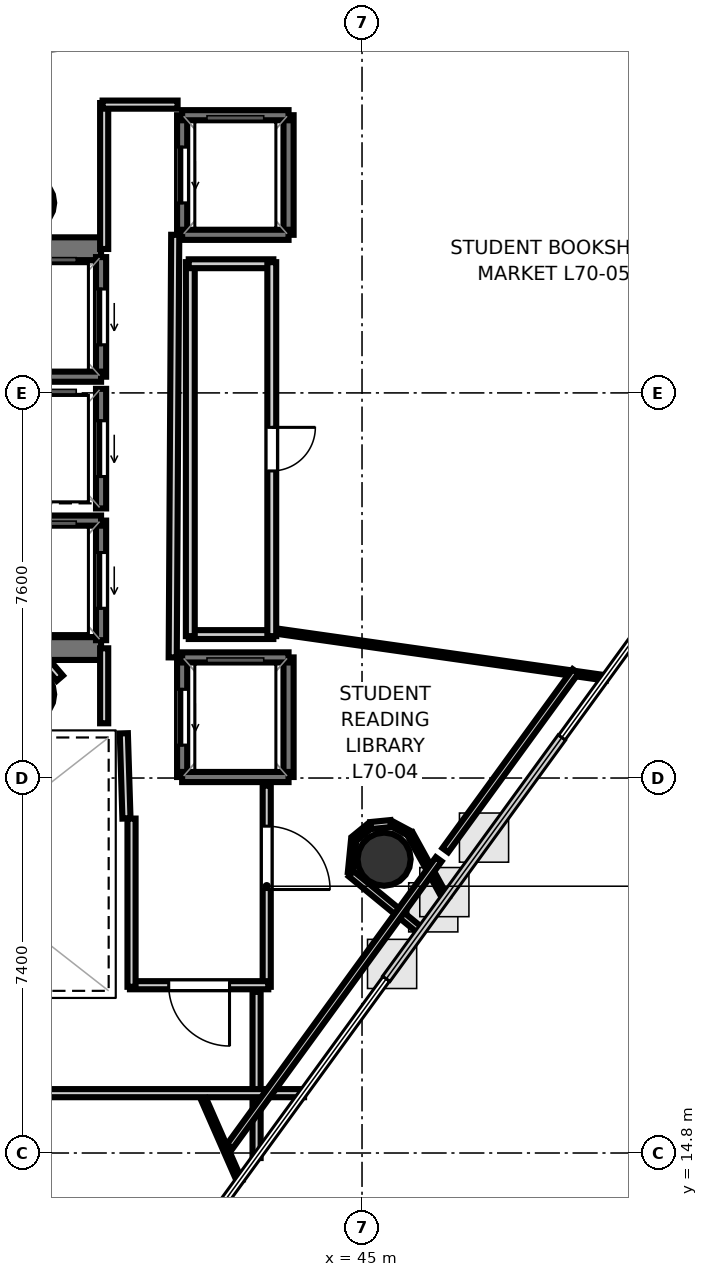
"""IFC4 building model, lengths in metres.
Left out: names, types, materials, properties, quantities, classifications, styles, units other than length and angle.
Written with IfcOpenShell. Run it as: python <this file> out.ifc"""

import sys

from ifc_helpers import new_model, si_unit, direction, frame, frame_2d, origin, origin_2d, place, context, subcontext, project, spatial, rectangle, hollow_circle, extrude, element, fill, save


model = new_model("IFC4")
c1 = context("Model", 3, precision=1e-05, world=origin(), true_north=direction((0.0, 1.0)))
c2 = subcontext(c1, "Body", "Model", "MODEL_VIEW")
j1 = project(units=[si_unit("LENGTHUNIT", "METRE"), si_unit("PLANEANGLEUNIT", "RADIAN")], contexts=[c1])
p1 = place(None, origin())
s1 = spatial("IfcSite", under=j1, at=p1, CompositionType="ELEMENT")
p2 = place(p1, origin())
s2 = spatial("IfcBuilding", under=s1, at=p2, CompositionType="ELEMENT")
p3 = place(p2, frame((0.0, 0.0, 272.3)))
s3 = spatial("IfcBuildingStorey", under=s2, at=p3, CompositionType="ELEMENT", Elevation=272.3)
p4 = place(p3, frame((29.33, 32.645, 0.0), z_axis=(0.0, 0.0, 1.0), x_axis=(1.0, 0.0, 0.0)))
e1 = element("IfcWall", 1, at=p4, inside=s3, PredefinedType="SHEAR", context=c2, shape_type="SweptSolid", body=[
    extrude(rectangle(XDim=10.52, YDim=0.45, at=frame_2d((5.26, 0.0))), origin(), (0.0, 0.0, 1.0), 3.4),
])
p5 = place(p4, frame((0.895, 0.0, 0.0)))
e2 = element("IfcOpeningElement", 2, at=p5, cuts=e1, PredefinedType="OPENING", context=c2, shape_type="SweptSolid", body=[
    extrude(rectangle(XDim=1.25, YDim=2.15, at=frame_2d((0.625, 1.075))), frame((0.0, 0.235, 0.0), z_axis=(0.0, -1.0, 0.0), x_axis=(1.0, 0.0, 0.0)), (0.0, 0.0, 1.0), 0.47),
])
p6 = place(p3, frame((29.33, 24.755, 0.0), z_axis=(0.0, 0.0, 1.0), x_axis=(1.0, 0.0, 0.0)))
e3 = element("IfcWall", 3, at=p6, inside=s3, PredefinedType="SHEAR", context=c2, shape_type="SweptSolid", body=[
    extrude(rectangle(XDim=10.52, YDim=0.45, at=frame_2d((5.26, 0.0))), origin(), (0.0, 0.0, 1.0), 3.4),
])
p7 = place(p6, frame((0.695, 0.0, 0.0)))
e4 = element("IfcOpeningElement", 4, at=p7, cuts=e3, PredefinedType="OPENING", context=c2, shape_type="SweptSolid", body=[
    extrude(rectangle(XDim=1.25, YDim=2.15, at=frame_2d((0.625, 1.075))), frame((0.0, 0.235, 0.0), z_axis=(0.0, -1.0, 0.0), x_axis=(1.0, 0.0, 0.0)), (0.0, 0.0, 1.0), 0.47),
])
for number, where, z_axis, x_axis in (
    (5, (38.4, 33.55, 0.0), (0.0, 0.0, 1.0), (1.0, 0.0, 0.0)),
    (6, (38.4, 23.85, 0.0), (0.0, 0.0, 1.0), (1.0, 0.0, 0.0)),
    (7, (45.436, 20.598, 0.0), (0.0, 0.0, 1.0), (1.0, 0.0, 0.0)),
):
    element("IfcColumn", number, at=place(p3, frame(where, z_axis=z_axis, x_axis=x_axis)), inside=s3, PredefinedType="COLUMN", context=c2, shape_type="SweptSolid", body=[
        extrude(hollow_circle(Radius=0.525, WallThickness=0.028, at=origin_2d()), origin(), (0.0, 0.0, 1.0), 3.7),
    ])
p8 = place(p3, frame((39.85, 30.12, 0.0), z_axis=(0.0, 0.0, 1.0), x_axis=(0.0, 1.0, 0.0)))
e8 = element("IfcWall", 8, at=p8, inside=s3, PredefinedType="SOLIDWALL", context=c2, shape_type="SweptSolid", body=[
    extrude(rectangle(XDim=2.36, YDim=0.2, at=frame_2d((1.18, 0.0))), origin(), (0.0, 0.0, 1.0), 3.4),
])
p9 = place(p8, frame((0.63, 0.0, 0.0)))
e9 = element("IfcOpeningElement", 9, at=p9, cuts=e8, PredefinedType="OPENING", context=c2, shape_type="SweptSolid", body=[
    extrude(rectangle(XDim=1.1, YDim=2.15, at=frame_2d((0.55, 1.075))), frame((0.0, 0.11, 0.0), z_axis=(0.0, -1.0, 0.0), x_axis=(1.0, 0.0, 0.0)), (0.0, 0.0, 1.0), 0.22),
])
p10 = place(p3, frame((37.75, 30.12, 0.0), z_axis=(0.0, 0.0, 1.0), x_axis=(1.0, 0.0, 0.0)))
e10 = element("IfcWall", 10, at=p10, inside=s3, PredefinedType="SOLIDWALL", context=c2, shape_type="SweptSolid", body=[
    extrude(rectangle(XDim=2.1, YDim=0.2, at=frame_2d((1.05, 0.0))), origin(), (0.0, 0.0, 1.0), 3.4),
])
p11 = place(p3, frame((39.85, 24.92, 0.0), z_axis=(0.0, 0.0, 1.0), x_axis=(0.0, 1.0, 0.0)))
e11 = element("IfcWall", 11, at=p11, inside=s3, PredefinedType="SOLIDWALL", context=c2, shape_type="SweptSolid", body=[
    extrude(rectangle(XDim=2.36, YDim=0.2, at=frame_2d((1.18, 0.0))), origin(), (0.0, 0.0, 1.0), 3.4),
])
p12 = place(p11, frame((0.63, 0.0, 0.0)))
e12 = element("IfcOpeningElement", 12, at=p12, cuts=e11, PredefinedType="OPENING", context=c2, shape_type="SweptSolid", body=[
    extrude(rectangle(XDim=1.1, YDim=2.15, at=frame_2d((0.55, 1.075))), frame((0.0, 0.11, 0.0), z_axis=(0.0, -1.0, 0.0), x_axis=(1.0, 0.0, 0.0)), (0.0, 0.0, 1.0), 0.22),
])
p13 = place(p3, frame((37.75, 27.28, 0.0), z_axis=(0.0, 0.0, 1.0), x_axis=(1.0, 0.0, 0.0)))
e13 = element("IfcWall", 13, at=p13, inside=s3, PredefinedType="SOLIDWALL", context=c2, shape_type="SweptSolid", body=[
    extrude(rectangle(XDim=2.1, YDim=0.2, at=frame_2d((1.05, 0.0))), origin(), (0.0, 0.0, 1.0), 3.4),
])
p14 = place(p3, frame((39.85, 27.52, 0.0), z_axis=(0.0, 0.0, 1.0), x_axis=(0.0, 1.0, 0.0)))
e14 = element("IfcWall", 14, at=p14, inside=s3, PredefinedType="SOLIDWALL", context=c2, shape_type="SweptSolid", body=[
    extrude(rectangle(XDim=2.36, YDim=0.2, at=frame_2d((1.18, 0.0))), origin(), (0.0, 0.0, 1.0), 3.4),
])
p15 = place(p14, frame((0.63, 0.0, 0.0)))
e15 = element("IfcOpeningElement", 15, at=p15, cuts=e14, PredefinedType="OPENING", context=c2, shape_type="SweptSolid", body=[
    extrude(rectangle(XDim=1.1, YDim=2.15, at=frame_2d((0.55, 1.075))), frame((0.0, 0.11, 0.0), z_axis=(0.0, -1.0, 0.0), x_axis=(1.0, 0.0, 0.0)), (0.0, 0.0, 1.0), 0.22),
])
p16 = place(p3, frame((43.55, 22.22, 0.0), z_axis=(0.0, 0.0, 1.0), x_axis=(0.0, 1.0, 0.0)))
e16 = element("IfcWall", 16, at=p16, inside=s3, PredefinedType="SOLIDWALL", context=c2, shape_type="SweptSolid", body=[
    extrude(rectangle(XDim=2.36, YDim=0.2, at=frame_2d((1.18, 0.0))), origin(), (0.0, 0.0, 1.0), 3.4),
])
p17 = place(p3, frame((41.45, 22.22, 0.0), z_axis=(0.0, 0.0, 1.0), x_axis=(0.0, 1.0, 0.0)))
e17 = element("IfcWall", 17, at=p17, inside=s3, PredefinedType="SOLIDWALL", context=c2, shape_type="SweptSolid", body=[
    extrude(rectangle(XDim=2.36, YDim=0.2, at=frame_2d((1.18, 0.0))), origin(), (0.0, 0.0, 1.0), 3.4),
])
p18 = place(p17, frame((0.63, 0.0, 0.0)))
e18 = element("IfcOpeningElement", 18, at=p18, cuts=e17, PredefinedType="OPENING", context=c2, shape_type="SweptSolid", body=[
    extrude(rectangle(XDim=1.1, YDim=2.15, at=frame_2d((0.55, 1.075))), frame((0.0, 0.11, 0.0), z_axis=(0.0, -1.0, 0.0), x_axis=(1.0, 0.0, 0.0)), (0.0, 0.0, 1.0), 0.22),
])
for number, where, z_axis, x_axis in (
    (19, (41.45, 24.58, 0.0), (0.0, 0.0, 1.0), (1.0, 0.0, 0.0)),
    (20, (41.45, 22.22, 0.0), (0.0, 0.0, 1.0), (1.0, 0.0, 0.0)),
):
    element("IfcWall", number, at=place(p3, frame(where, z_axis=z_axis, x_axis=x_axis)), inside=s3, PredefinedType="SOLIDWALL", context=c2, shape_type="SweptSolid", body=[
        extrude(rectangle(XDim=2.1, YDim=0.2, at=frame_2d((1.05, 0.0))), origin(), (0.0, 0.0, 1.0), 3.4),
    ])
p19 = place(p3, frame((43.55, 32.92, 0.0), z_axis=(0.0, 0.0, 1.0), x_axis=(0.0, 1.0, 0.0)))
e21 = element("IfcWall", 21, at=p19, inside=s3, PredefinedType="SOLIDWALL", context=c2, shape_type="SweptSolid", body=[
    extrude(rectangle(XDim=2.36, YDim=0.2, at=frame_2d((1.18, 0.0))), origin(), (0.0, 0.0, 1.0), 3.4),
])
p20 = place(p3, frame((41.45, 32.92, 0.0), z_axis=(0.0, 0.0, 1.0), x_axis=(0.0, 1.0, 0.0)))
e22 = element("IfcWall", 22, at=p20, inside=s3, PredefinedType="SOLIDWALL", context=c2, shape_type="SweptSolid", body=[
    extrude(rectangle(XDim=2.36, YDim=0.2, at=frame_2d((1.18, 0.0))), origin(), (0.0, 0.0, 1.0), 3.4),
])
p21 = place(p20, frame((0.63, 0.0, 0.0)))
e23 = element("IfcOpeningElement", 23, at=p21, cuts=e22, PredefinedType="OPENING", context=c2, shape_type="SweptSolid", body=[
    extrude(rectangle(XDim=1.1, YDim=2.15, at=frame_2d((0.55, 1.075))), frame((0.0, 0.11, 0.0), z_axis=(0.0, -1.0, 0.0), x_axis=(1.0, 0.0, 0.0)), (0.0, 0.0, 1.0), 0.22),
])
for number, where, z_axis, x_axis in (
    (24, (41.45, 35.28, 0.0), (0.0, 0.0, 1.0), (1.0, 0.0, 0.0)),
    (25, (41.45, 32.92, 0.0), (0.0, 0.0, 1.0), (1.0, 0.0, 0.0)),
):
    element("IfcWall", number, at=place(p3, frame(where, z_axis=z_axis, x_axis=x_axis)), inside=s3, PredefinedType="SOLIDWALL", context=c2, shape_type="SweptSolid", body=[
        extrude(rectangle(XDim=2.1, YDim=0.2, at=frame_2d((1.05, 0.0))), origin(), (0.0, 0.0, 1.0), 3.4),
    ])
p22 = place(p3, frame((40.351, 21.401, 0.0), z_axis=(0.0, 0.0, 1.0), x_axis=(-0.031058045979, 0.999517582527, 0.0)))
e26 = element("IfcWall", 26, at=p22, inside=s3, PredefinedType="PARTITIONING", context=c2, shape_type="SweptSolid", body=[
    extrude(rectangle(XDim=1.682, YDim=0.16, at=frame_2d((0.841, 0.0))), origin(), (0.0, 0.0, 1.0), 2.72),
])
p23 = place(p3, frame((39.911, 23.28, 0.0), z_axis=(0.0, 0.0, 1.0), x_axis=(0.0, 1.0, 0.0)))
e27 = element("IfcWall", 27, at=p23, inside=s3, PredefinedType="PARTITIONING", context=c2, shape_type="SweptSolid", body=[
    extrude(rectangle(XDim=1.48, YDim=0.16, at=frame_2d((0.74, 0.0))), origin(), (0.0, 0.0, 1.0), 2.72),
])
p24 = place(p3, frame((39.911, 32.64, 0.0), z_axis=(0.0, 0.0, 1.0), x_axis=(0.0, 1.0, 0.0)))
e28 = element("IfcWall", 28, at=p24, inside=s3, PredefinedType="PARTITIONING", context=c2, shape_type="SweptSolid", body=[
    extrude(rectangle(XDim=2.88, YDim=0.16, at=frame_2d((1.44, 0.0))), origin(), (0.0, 0.0, 1.0), 2.72),
])
p25 = place(p3, frame((39.88, 35.489, 0.0), z_axis=(0.0, 0.0, 1.0), x_axis=(1.0, 0.0, 0.0)))
e29 = element("IfcWall", 29, at=p25, inside=s3, PredefinedType="PARTITIONING", context=c2, shape_type="SweptSolid", body=[
    extrude(rectangle(XDim=1.48, YDim=0.16, at=frame_2d((0.74, 0.0))), origin(), (0.0, 0.0, 1.0), 2.72),
])
p26 = place(p3, frame((41.313, 32.92, 0.0), z_axis=(0.0, 0.0, 1.0), x_axis=(-0.005942518022, -0.999982343084, 0.0)))
e30 = element("IfcWall", 30, at=p26, inside=s3, PredefinedType="PARTITIONING", context=c2, shape_type="SweptSolid", body=[
    extrude(rectangle(XDim=8.34, YDim=0.16, at=frame_2d((4.17, 0.0))), origin(), (0.0, 0.0, 1.0), 2.72),
])
p27 = place(p3, frame((43.119, 22.05, 0.0), z_axis=(0.0, 0.0, 1.0), x_axis=(0.0, -1.0, 0.0)))
e31 = element("IfcWall", 31, at=p27, inside=s3, PredefinedType="PARTITIONING", context=c2, shape_type="SweptSolid", body=[
    extrude(rectangle(XDim=3.97, YDim=0.16, at=frame_2d((1.985, 0.0))), origin(), (0.0, 0.0, 1.0), 2.72),
])
p28 = place(p27, frame((0.8, 0.0, 0.0)))
e32 = element("IfcOpeningElement", 32, at=p28, cuts=e31, PredefinedType="OPENING", context=c2, shape_type="SweptSolid", body=[
    extrude(rectangle(XDim=1.25, YDim=2.2, at=frame_2d((0.625, 1.1))), frame((0.0, 0.09, 0.0), z_axis=(0.0, -1.0, 0.0), x_axis=(1.0, 0.0, 0.0)), (0.0, 0.0, 1.0), 0.18),
])
p29 = place(p3, frame((43.15, 18.111, 0.0), z_axis=(0.0, 0.0, 1.0), x_axis=(-1.0, 0.0, 0.0)))
e33 = element("IfcWall", 33, at=p29, inside=s3, PredefinedType="PARTITIONING", context=c2, shape_type="SweptSolid", body=[
    extrude(rectangle(XDim=2.73, YDim=0.16, at=frame_2d((1.365, 0.0))), origin(), (0.0, 0.0, 1.0), 2.72),
])
p30 = place(p29, frame((0.765, 0.0, 0.0)))
e34 = element("IfcOpeningElement", 34, at=p30, cuts=e33, PredefinedType="OPENING", context=c2, shape_type="SweptSolid", body=[
    extrude(rectangle(XDim=1.2, YDim=2.15, at=frame_2d((0.6, 1.075))), frame((0.0, 0.09, 0.0), z_axis=(0.0, -1.0, 0.0), x_axis=(1.0, 0.0, 0.0)), (0.0, 0.0, 1.0), 0.18),
])
p31 = place(p3, frame((40.451, 18.08, 0.0), z_axis=(0.0, 0.0, 1.0), x_axis=(0.0, 1.0, 0.0)))
e35 = element("IfcWall", 35, at=p31, inside=s3, PredefinedType="PARTITIONING", context=c2, shape_type="SweptSolid", body=[
    extrude(rectangle(XDim=3.32, YDim=0.16, at=frame_2d((1.66, 0.0))), origin(), (0.0, 0.0, 1.0), 2.72),
])
p32 = place(p3, frame((43.25, 25.031, 0.0), z_axis=(0.0, 0.0, 1.0), x_axis=(-1.0, 0.0, 0.0)))
e36 = element("IfcWall", 36, at=p32, inside=s3, PredefinedType="PLUMBINGWALL", context=c2, shape_type="SweptSolid", body=[
    extrude(rectangle(XDim=1.67, YDim=0.175, at=frame_2d((0.835, 0.0))), origin(), (0.0, 0.0, 1.0), 2.72),
])
p33 = place(p3, frame((41.611, 25.0, 0.0), z_axis=(0.0, 0.0, 1.0), x_axis=(0.0, 1.0, 0.0)))
e37 = element("IfcWall", 37, at=p33, inside=s3, PredefinedType="PLUMBINGWALL", context=c2, shape_type="SweptSolid", body=[
    extrude(rectangle(XDim=7.38, YDim=0.175, at=frame_2d((3.69, 0.0))), origin(), (0.0, 0.0, 1.0), 2.72),
])
p34 = place(p3, frame((41.58, 32.349, 0.0), z_axis=(0.0, 0.0, 1.0), x_axis=(1.0, 0.0, 0.0)))
e38 = element("IfcWall", 38, at=p34, inside=s3, PredefinedType="PLUMBINGWALL", context=c2, shape_type="SweptSolid", body=[
    extrude(rectangle(XDim=1.67, YDim=0.175, at=frame_2d((0.835, 0.0))), origin(), (0.0, 0.0, 1.0), 2.72),
])
p35 = place(p3, frame((43.219, 32.38, 0.0), z_axis=(0.0, 0.0, 1.0), x_axis=(0.0, -1.0, 0.0)))
e39 = element("IfcWall", 39, at=p35, inside=s3, PredefinedType="PLUMBINGWALL", context=c2, shape_type="SweptSolid", body=[
    extrude(rectangle(XDim=7.38, YDim=0.175, at=frame_2d((3.69, 0.0))), origin(), (0.0, 0.0, 1.0), 2.72),
])
p36 = place(p35, frame((3.26, 0.0, 0.0)))
e40 = element("IfcOpeningElement", 40, at=p36, cuts=e39, PredefinedType="OPENING", context=c2, shape_type="SweptSolid", body=[
    extrude(rectangle(XDim=0.86, YDim=2.05, at=frame_2d((0.43, 1.025))), frame((0.0, 0.097, 0.0), z_axis=(0.0, -1.0, 0.0), x_axis=(1.0, 0.0, 0.0)), (0.0, 0.0, 1.0), 0.195),
])
p37 = place(p3, frame((39.036, 24.17, 0.0), z_axis=(0.0, 0.0, 1.0), x_axis=(-0.652260263346, 0.757995084984, 0.0)))
e41 = element("IfcWall", 41, at=p37, inside=s3, PredefinedType="PARTITIONING", context=c2, shape_type="SweptSolid", body=[
    extrude(rectangle(XDim=0.355, YDim=0.16, at=frame_2d((0.178, 0.0))), origin(), (0.0, 0.0, 1.0), 2.72),
])
p38 = place(p3, frame((42.919, 17.98, 0.0), z_axis=(0.0, 0.0, 1.0), x_axis=(0.0, -1.0, 0.0)))
e42 = element("IfcWall", 42, at=p38, inside=s3, PredefinedType="PARTITIONING", context=c2, shape_type="SweptSolid", body=[
    extrude(rectangle(XDim=3.279, YDim=0.16, at=frame_2d((1.64, 0.0))), origin(), (0.0, 0.0, 1.0), 2.72),
])
p39 = place(p3, frame((43.856, 15.981, 0.0), z_axis=(0.0, 0.0, 1.0), x_axis=(-1.0, 0.0, 0.0)))
e43 = element("IfcWall", 43, at=p39, inside=s3, PredefinedType="PARTITIONING", context=c2, shape_type="SweptSolid", body=[
    extrude(rectangle(XDim=15.256, YDim=0.16, at=frame_2d((7.628, 0.0))), origin(), (0.0, 0.0, 1.0), 2.72),
])
p40 = place(p39, frame((11.936, 0.0, 0.0)))
e44 = element("IfcOpeningElement", 44, at=p40, cuts=e43, PredefinedType="OPENING", context=c2, shape_type="SweptSolid", body=[
    extrude(rectangle(XDim=1.25, YDim=2.2, at=frame_2d((0.625, 1.1))), frame((0.0, 0.09, 0.0), z_axis=(0.0, -1.0, 0.0), x_axis=(1.0, 0.0, 0.0)), (0.0, 0.0, 1.0), 0.18),
])
p41 = place(p39, frame((5.607, 0.0, 0.0)))
e45 = element("IfcOpeningElement", 45, at=p41, cuts=e43, PredefinedType="OPENING", context=c2, shape_type="SweptSolid", body=[
    extrude(rectangle(XDim=1.25, YDim=2.2, at=frame_2d((0.625, 1.1))), frame((0.0, 0.09, 0.0), z_axis=(0.0, -1.0, 0.0), x_axis=(1.0, 0.0, 0.0)), (0.0, 0.0, 1.0), 0.18),
])
p42 = place(p3, frame((41.876, 15.857, 0.0), z_axis=(0.0, 0.0, 1.0), x_axis=(0.402142340912, -0.915577160946, 0.0)))
e46 = element("IfcWall", 46, at=p42, inside=s3, PredefinedType="PARTITIONING", context=c2, shape_type="SweptSolid", body=[
    extrude(rectangle(XDim=1.77, YDim=0.105, at=frame_2d((0.885, 0.0))), origin(), (0.0, 0.0, 1.0), 2.72),
])
p43 = place(p3, frame((43.346, 25.095, 0.0), z_axis=(0.0, 0.0, 1.0), x_axis=(0.990037397819, -0.140804655176, 0.0)))
e47 = element("IfcWall", 47, at=p43, inside=s3, PredefinedType="PARTITIONING", context=c2, shape_type="SweptSolid", body=[
    extrude(rectangle(XDim=6.54, YDim=0.105, at=frame_2d((3.27, 0.0))), origin(), (0.0, 0.0, 1.0), 2.72),
])
p44 = place(p3, frame((49.214, 24.306, 0.0), z_axis=(0.0, 0.0, 1.0), x_axis=(-0.588450936064, -0.808532928115, 0.0)))
e48 = element("IfcWall", 48, at=p44, inside=s3, PredefinedType="PARTITIONING", context=c2, shape_type="SweptSolid", body=[
    extrude(rectangle(XDim=4.366, YDim=0.14, at=frame_2d((2.183, 0.0))), origin(), (0.0, 0.0, 1.0), 2.72),
])
p45 = place(p3, frame((46.653, 19.82, 0.0), z_axis=(0.0, 0.0, 1.0), x_axis=(-0.483254274617, 0.875480043213, 0.0)))
e49 = element("IfcWall", 49, at=p45, inside=s3, PredefinedType="PARTITIONING", context=c2, shape_type="SweptSolid", body=[
    extrude(rectangle(XDim=1.459, YDim=0.12, at=frame_2d((0.729, 0.0))), origin(), (0.0, 0.0, 1.0), 2.72),
])
p46 = place(p3, frame((45.935, 21.11, 0.0), z_axis=(0.0, 0.0, 1.0), x_axis=(-0.881944865518, 0.471352579484, 0.0)))
e50 = element("IfcWall", 50, at=p46, inside=s3, PredefinedType="PARTITIONING", context=c2, shape_type="SweptSolid", body=[
    extrude(rectangle(XDim=0.398, YDim=0.105, at=frame_2d((0.199, 0.0))), origin(), (0.0, 0.0, 1.0), 2.72),
])
p47 = place(p3, frame((45.567, 21.301, 0.0), z_axis=(0.0, 0.0, 1.0), x_axis=(-0.995164018156, -0.098227170207, 0.0)))
e51 = element("IfcWall", 51, at=p47, inside=s3, PredefinedType="PARTITIONING", context=c2, shape_type="SweptSolid", body=[
    extrude(rectangle(XDim=0.398, YDim=0.14, at=frame_2d((0.199, 0.0))), origin(), (0.0, 0.0, 1.0), 2.72),
])
p48 = place(p3, frame((45.154, 21.255, 0.0), z_axis=(0.0, 0.0, 1.0), x_axis=(-0.773027083708, -0.634373019487, 0.0)))
e52 = element("IfcWall", 52, at=p48, inside=s3, PredefinedType="PARTITIONING", context=c2, shape_type="SweptSolid", body=[
    extrude(rectangle(XDim=0.398, YDim=0.12, at=frame_2d((0.199, 0.0))), origin(), (0.0, 0.0, 1.0), 2.72),
])
p49 = place(p3, frame((44.836, 20.982, 0.0), z_axis=(0.0, 0.0, 1.0), x_axis=(-0.098268734456, -0.995159914701, 0.0)))
e53 = element("IfcWall", 53, at=p49, inside=s3, PredefinedType="PARTITIONING", context=c2, shape_type="SweptSolid", body=[
    extrude(rectangle(XDim=0.646, YDim=0.105, at=frame_2d((0.323, 0.0))), origin(), (0.0, 0.0, 1.0), 2.72),
])
p50 = place(p3, frame((44.783, 20.312, 0.0), z_axis=(0.0, 0.0, 1.0), x_axis=(0.772998561014, -0.634407774756, 0.0)))
e54 = element("IfcWall", 54, at=p50, inside=s3, PredefinedType="PARTITIONING", context=c2, shape_type="SweptSolid", body=[
    extrude(rectangle(XDim=1.806, YDim=0.14, at=frame_2d((0.903, 0.0))), origin(), (0.0, 0.0, 1.0), 2.72),
])
p51 = place(p3, frame((46.513, 20.596, 0.0), z_axis=(0.0, 0.0, 1.0), x_axis=(-0.588445207011, -0.808537097693, 0.0)))
e55 = element("IfcWall", 55, at=p51, inside=s3, PredefinedType="PARTITIONING", context=c2, shape_type="SweptSolid", body=[
    extrude(rectangle(XDim=7.005, YDim=0.14, at=frame_2d((3.502, 0.0))), origin(), (0.0, 0.0, 1.0), 2.72),
])
p52 = place(p3, frame((20.896, 34.987, 0.0), z_axis=(0.0, 0.0, 1.0), x_axis=(0.995809385276, 0.091453092875, 0.0)))
e56 = element("IfcWall", 56, at=p52, inside=s3, PredefinedType="PARTITIONING", context=c2, shape_type="SweptSolid", body=[
    extrude(rectangle(XDim=34.985, YDim=0.12, at=frame_2d((17.492, 0.0))), origin(), (0.0, 0.0, 1.0), 2.72),
])
p53 = place(p9, origin())
e57 = element("IfcDoor", 57, at=p53, inside=s3, OperationType="SLIDING_TO_LEFT", PredefinedType="DOOR", context=c2, shape_type="SweptSolid", body=[
    extrude(rectangle(XDim=1.1, YDim=2.15, at=frame_2d((0.55, 1.075))), frame((0.0, 0.025, 0.0), z_axis=(0.0, -1.0, 0.0), x_axis=(1.0, 0.0, 0.0)), (0.0, 0.0, 1.0), 0.05),
])
fill(e9, e57)
p54 = place(p12, origin())
e58 = element("IfcDoor", 58, at=p54, inside=s3, OperationType="SLIDING_TO_LEFT", PredefinedType="DOOR", context=c2, shape_type="SweptSolid", body=[
    extrude(rectangle(XDim=1.1, YDim=2.15, at=frame_2d((0.55, 1.075))), frame((0.0, 0.025, 0.0), z_axis=(0.0, -1.0, 0.0), x_axis=(1.0, 0.0, 0.0)), (0.0, 0.0, 1.0), 0.05),
])
fill(e12, e58)
p55 = place(p15, origin())
e59 = element("IfcDoor", 59, at=p55, inside=s3, OperationType="SLIDING_TO_LEFT", PredefinedType="DOOR", context=c2, shape_type="SweptSolid", body=[
    extrude(rectangle(XDim=1.1, YDim=2.15, at=frame_2d((0.55, 1.075))), frame((0.0, 0.025, 0.0), z_axis=(0.0, -1.0, 0.0), x_axis=(1.0, 0.0, 0.0)), (0.0, 0.0, 1.0), 0.05),
])
fill(e15, e59)
p56 = place(p18, origin())
e60 = element("IfcDoor", 60, at=p56, inside=s3, OperationType="SLIDING_TO_LEFT", PredefinedType="DOOR", context=c2, shape_type="SweptSolid", body=[
    extrude(rectangle(XDim=1.1, YDim=2.15, at=frame_2d((0.55, 1.075))), frame((0.0, 0.025, 0.0), z_axis=(0.0, -1.0, 0.0), x_axis=(1.0, 0.0, 0.0)), (0.0, 0.0, 1.0), 0.05),
])
fill(e18, e60)
p57 = place(p21, origin())
e61 = element("IfcDoor", 61, at=p57, inside=s3, OperationType="SLIDING_TO_LEFT", PredefinedType="DOOR", context=c2, shape_type="SweptSolid", body=[
    extrude(rectangle(XDim=1.1, YDim=2.15, at=frame_2d((0.55, 1.075))), frame((0.0, 0.025, 0.0), z_axis=(0.0, -1.0, 0.0), x_axis=(1.0, 0.0, 0.0)), (0.0, 0.0, 1.0), 0.05),
])
fill(e23, e61)
p58 = place(p30, origin())
e62 = element("IfcDoor", 62, at=p58, inside=s3, OperationType="SINGLE_SWING_LEFT", PredefinedType="DOOR", context=c2, shape_type="SweptSolid", body=[
    extrude(rectangle(XDim=1.2, YDim=2.15, at=frame_2d((0.6, 1.075))), frame((0.0, 0.025, 0.0), z_axis=(0.0, -1.0, 0.0), x_axis=(1.0, 0.0, 0.0)), (0.0, 0.0, 1.0), 0.05),
])
fill(e34, e62)
p59 = place(p28, origin())
e63 = element("IfcDoor", 63, at=p59, inside=s3, OperationType="SINGLE_SWING_RIGHT", PredefinedType="DOOR", context=c2, shape_type="SweptSolid", body=[
    extrude(rectangle(XDim=1.25, YDim=2.2, at=frame_2d((0.625, 1.1))), frame((0.0, 0.025, 0.0), z_axis=(0.0, -1.0, 0.0), x_axis=(1.0, 0.0, 0.0)), (0.0, 0.0, 1.0), 0.05),
])
fill(e32, e63)
p60 = place(p36, origin())
e64 = element("IfcDoor", 64, at=p60, inside=s3, OperationType="SINGLE_SWING_LEFT", PredefinedType="DOOR", context=c2, shape_type="SweptSolid", body=[
    extrude(rectangle(XDim=0.86, YDim=2.05, at=frame_2d((0.43, 1.025))), frame((0.0, 0.025, 0.0), z_axis=(0.0, -1.0, 0.0), x_axis=(1.0, 0.0, 0.0)), (0.0, 0.0, 1.0), 0.05),
])
fill(e40, e64)
save(model, sys.argv[1])
